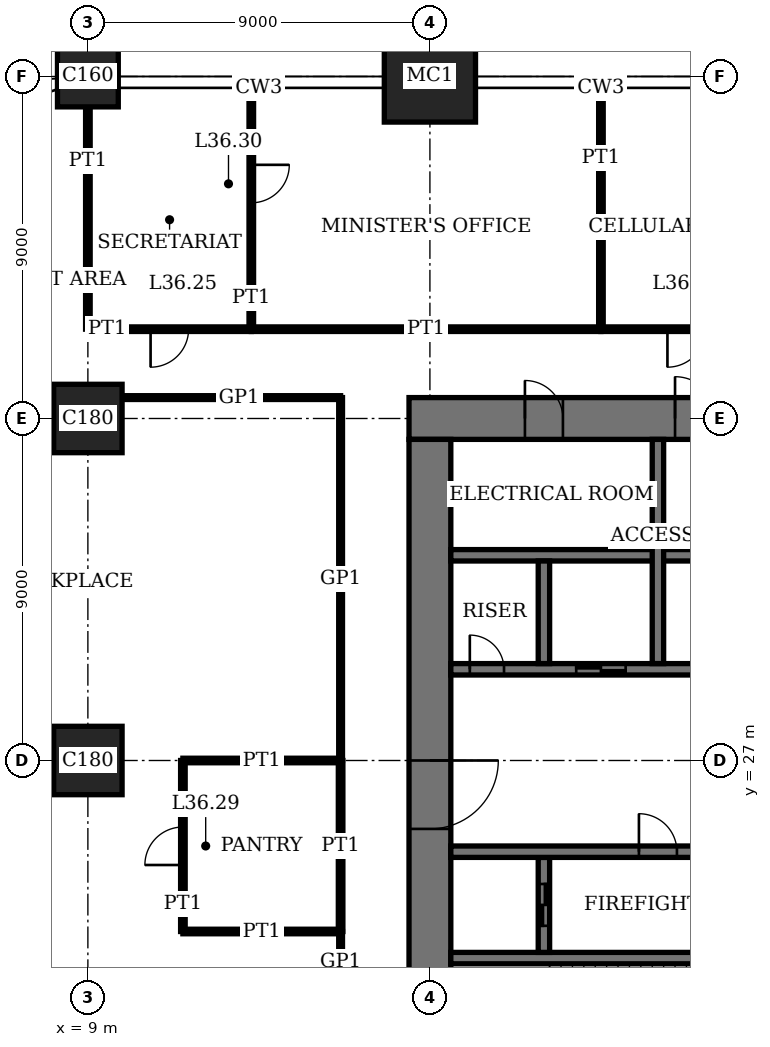
"""IFC4 building model, lengths in metres.
Left out: names, types, materials, properties, quantities, classifications, styles, units other than length and angle.
Written with IfcOpenShell. Run it as: python <this file> out.ifc"""

import sys

from ifc_helpers import new_model, si_unit, direction, frame, frame_2d, origin, origin_2d, place, context, subcontext, project, spatial, rectangle, extrude, element, fill, save


model = new_model("IFC4")
c1 = context("Model", 3, precision=1e-05, world=origin(), true_north=direction((0.0, 1.0)))
c2 = subcontext(c1, "Body", "Model", "MODEL_VIEW")
j1 = project(units=[si_unit("LENGTHUNIT", "METRE"), si_unit("PLANEANGLEUNIT", "RADIAN")], contexts=[c1])
p1 = place(None, origin())
s1 = spatial("IfcSite", under=j1, at=p1, CompositionType="ELEMENT")
p2 = place(p1, origin())
s2 = spatial("IfcBuilding", under=s1, at=p2, CompositionType="ELEMENT")
p3 = place(p2, frame((0.0, 0.0, 149.0)))
s3 = spatial("IfcBuildingStorey", under=s2, at=p3, CompositionType="ELEMENT", Elevation=149.0)
for number, where, z_axis, x_axis in (
    (1, (9.0, 27.0, 0.0), (0.0, 0.0, 1.0), (1.0, 0.0, 0.0)),
    (2, (9.0, 36.0, 0.0), (0.0, 0.0, 1.0), (1.0, 0.0, 0.0)),
):
    element("IfcColumn", number, at=place(p3, frame(where, z_axis=z_axis, x_axis=x_axis)), inside=s3, PredefinedType="COLUMN", context=c2, shape_type="SweptSolid", body=[
        extrude(rectangle(XDim=1.8, YDim=1.8, at=origin_2d()), origin(), (0.0, 0.0, 1.0), 4.0),
    ])
p4 = place(p3, frame((9.0, 45.0, 0.0), z_axis=(0.0, 0.0, 1.0), x_axis=(1.0, 0.0, 0.0)))
e3 = element("IfcColumn", 3, at=p4, inside=s3, PredefinedType="COLUMN", context=c2, shape_type="SweptSolid", body=[
    extrude(rectangle(XDim=1.6, YDim=1.6, at=origin_2d()), origin(), (0.0, 0.0, 1.0), 4.0),
])
p5 = place(p3, frame((18.0, 45.0, 0.0), z_axis=(0.0, 0.0, 1.0), x_axis=(1.0, 0.0, 0.0)))
e4 = element("IfcColumn", 4, at=p5, inside=s3, PredefinedType="COLUMN", context=c2, shape_type="SweptSolid", body=[
    extrude(rectangle(XDim=2.4, YDim=2.4, at=origin_2d()), origin(), (0.0, 0.0, 1.0), 4.0),
])
p6 = place(p3, frame((45.55, 36.0, 0.0), z_axis=(0.0, 0.0, 1.0), x_axis=(-1.0, 0.0, 0.0)))
e5 = element("IfcWall", 5, at=p6, inside=s3, PredefinedType="SHEAR", context=c2, shape_type="SweptSolid", body=[
    extrude(rectangle(XDim=28.1, YDim=1.1, at=frame_2d((14.05, 0.0))), origin(), (0.0, 0.0, 1.0), 4.0),
])
p7 = place(p6, frame((11.55, 0.0, 0.0)))
e6 = element("IfcOpeningElement", 6, at=p7, cuts=e5, PredefinedType="OPENING", context=c2, shape_type="SweptSolid", body=[
    extrude(rectangle(XDim=1.0, YDim=2.4, at=frame_2d((0.5, 1.2))), frame((0.0, 0.56, 0.0), z_axis=(0.0, -1.0, 0.0), x_axis=(1.0, 0.0, 0.0)), (0.0, 0.0, 1.0), 1.12),
])
p8 = place(p6, frame((16.55, 0.0, 0.0)))
e7 = element("IfcOpeningElement", 7, at=p8, cuts=e5, PredefinedType="OPENING", context=c2, shape_type="SweptSolid", body=[
    extrude(rectangle(XDim=1.0, YDim=2.4, at=frame_2d((0.5, 1.2))), frame((0.0, 0.56, 0.0), z_axis=(0.0, -1.0, 0.0), x_axis=(1.0, 0.0, 0.0)), (0.0, 0.0, 1.0), 1.12),
])
p9 = place(p6, frame((20.0, 0.0, 0.0)))
e8 = element("IfcOpeningElement", 8, at=p9, cuts=e5, PredefinedType="OPENING", context=c2, shape_type="SweptSolid", body=[
    extrude(rectangle(XDim=1.1, YDim=2.4, at=frame_2d((0.55, 1.2))), frame((0.0, 0.56, 0.0), z_axis=(0.0, -1.0, 0.0), x_axis=(1.0, 0.0, 0.0)), (0.0, 0.0, 1.0), 1.12),
])
p10 = place(p6, frame((24.05, 0.0, 0.0)))
e9 = element("IfcOpeningElement", 9, at=p10, cuts=e5, PredefinedType="OPENING", context=c2, shape_type="SweptSolid", body=[
    extrude(rectangle(XDim=1.0, YDim=2.4, at=frame_2d((0.5, 1.2))), frame((0.0, 0.56, 0.0), z_axis=(0.0, -1.0, 0.0), x_axis=(1.0, 0.0, 0.0)), (0.0, 0.0, 1.0), 1.12),
])
p11 = place(p3, frame((18.0, 35.45, 0.0), z_axis=(0.0, 0.0, 1.0), x_axis=(0.0, -1.0, 0.0)))
e10 = element("IfcWall", 10, at=p11, inside=s3, PredefinedType="SHEAR", context=c2, shape_type="SweptSolid", body=[
    extrude(rectangle(XDim=16.9, YDim=1.1, at=frame_2d((8.45, 0.0))), origin(), (0.0, 0.0, 1.0), 4.0),
])
p12 = place(p11, frame((8.45, 0.0, 0.0)))
e11 = element("IfcOpeningElement", 11, at=p12, cuts=e10, PredefinedType="OPENING", context=c2, shape_type="SweptSolid", body=[
    extrude(rectangle(XDim=1.8, YDim=2.4, at=frame_2d((0.9, 1.2))), frame((0.0, 0.56, 0.0), z_axis=(0.0, -1.0, 0.0), x_axis=(1.0, 0.0, 0.0)), (0.0, 0.0, 1.0), 1.12),
])
p13 = place(p3, frame((18.55, 21.8, 0.0), z_axis=(0.0, 0.0, 1.0), x_axis=(1.0, 0.0, 0.0)))
e12 = element("IfcWall", 12, at=p13, inside=s3, PredefinedType="SHEAR", context=c2, shape_type="SweptSolid", body=[
    extrude(rectangle(XDim=8.3, YDim=0.3, at=frame_2d((4.15, 0.0))), origin(), (0.0, 0.0, 1.0), 4.0),
])
p14 = place(p13, frame((6.85, 0.0, 0.0)))
e13 = element("IfcOpeningElement", 13, at=p14, cuts=e12, PredefinedType="OPENING", context=c2, shape_type="SweptSolid", body=[
    extrude(rectangle(XDim=1.0, YDim=2.4, at=frame_2d((0.5, 1.2))), frame((0.0, 0.16, 0.0), z_axis=(0.0, -1.0, 0.0), x_axis=(1.0, 0.0, 0.0)), (0.0, 0.0, 1.0), 0.32),
])
p15 = place(p3, frame((21.0, 21.95, 0.0), z_axis=(0.0, 0.0, 1.0), x_axis=(0.0, 1.0, 0.0)))
e14 = element("IfcWall", 14, at=p15, inside=s3, PredefinedType="SHEAR", context=c2, shape_type="SweptSolid", body=[
    extrude(rectangle(XDim=2.5, YDim=0.3, at=frame_2d((1.25, 0.0))), origin(), (0.0, 0.0, 1.0), 4.0),
])
p16 = place(p15, frame((0.7, 0.0, 0.0)))
e15 = element("IfcOpeningElement", 15, at=p16, cuts=e14, PredefinedType="OPENING", context=c2, shape_type="SweptSolid", body=[
    extrude(rectangle(XDim=1.1, YDim=2.4, at=frame_2d((0.55, 1.2))), frame((0.0, 0.16, 0.0), z_axis=(0.0, -1.0, 0.0), x_axis=(1.0, 0.0, 0.0)), (0.0, 0.0, 1.0), 0.32),
])
p17 = place(p3, frame((18.55, 24.6, 0.0), z_axis=(0.0, 0.0, 1.0), x_axis=(1.0, 0.0, 0.0)))
e16 = element("IfcWall", 16, at=p17, inside=s3, PredefinedType="SHEAR", context=c2, shape_type="SweptSolid", body=[
    extrude(rectangle(XDim=25.9, YDim=0.3, at=frame_2d((12.95, 0.0))), origin(), (0.0, 0.0, 1.0), 4.0),
])
p18 = place(p17, frame((4.95, 0.0, 0.0)))
e17 = element("IfcOpeningElement", 17, at=p18, cuts=e16, PredefinedType="OPENING", context=c2, shape_type="SweptSolid", body=[
    extrude(rectangle(XDim=1.0, YDim=2.4, at=frame_2d((0.5, 1.2))), frame((0.0, 0.16, 0.0), z_axis=(0.0, -1.0, 0.0), x_axis=(1.0, 0.0, 0.0)), (0.0, 0.0, 1.0), 0.32),
])
p19 = place(p17, frame((24.5, 0.0, 0.0)))
e18 = element("IfcOpeningElement", 18, at=p19, cuts=e16, PredefinedType="OPENING", context=c2, shape_type="SweptSolid", body=[
    extrude(rectangle(XDim=0.9, YDim=2.1, at=frame_2d((0.45, 1.05))), frame((0.0, 0.16, 0.0), z_axis=(0.0, -1.0, 0.0), x_axis=(1.0, 0.0, 0.0)), (0.0, 0.0, 1.0), 0.32),
])
p20 = place(p17, frame((21.3, 0.0, 0.0)))
e19 = element("IfcOpeningElement", 19, at=p20, cuts=e16, PredefinedType="OPENING", context=c2, shape_type="SweptSolid", body=[
    extrude(rectangle(XDim=1.3, YDim=2.4, at=frame_2d((0.65, 1.2))), frame((0.0, 0.16, 0.0), z_axis=(0.0, -1.0, 0.0), x_axis=(1.0, 0.0, 0.0)), (0.0, 0.0, 1.0), 0.32),
])
p21 = place(p3, frame((18.55, 29.4, 0.0), z_axis=(0.0, 0.0, 1.0), x_axis=(1.0, 0.0, 0.0)))
e20 = element("IfcWall", 20, at=p21, inside=s3, PredefinedType="SHEAR", context=c2, shape_type="SweptSolid", body=[
    extrude(rectangle(XDim=25.9, YDim=0.3, at=frame_2d((12.95, 0.0))), origin(), (0.0, 0.0, 1.0), 4.0),
])
p22 = place(p21, frame((19.95, 0.0, 0.0)))
e21 = element("IfcOpeningElement", 21, at=p22, cuts=e20, PredefinedType="OPENING", context=c2, shape_type="SweptSolid", body=[
    extrude(rectangle(XDim=1.0, YDim=2.4, at=frame_2d((0.5, 1.2))), frame((0.0, 0.16, 0.0), z_axis=(0.0, -1.0, 0.0), x_axis=(1.0, 0.0, 0.0)), (0.0, 0.0, 1.0), 0.32),
])
p23 = place(p21, frame((0.5, 0.0, 0.0)))
e22 = element("IfcOpeningElement", 22, at=p23, cuts=e20, PredefinedType="OPENING", context=c2, shape_type="SweptSolid", body=[
    extrude(rectangle(XDim=0.9, YDim=2.1, at=frame_2d((0.45, 1.05))), frame((0.0, 0.16, 0.0), z_axis=(0.0, -1.0, 0.0), x_axis=(1.0, 0.0, 0.0)), (0.0, 0.0, 1.0), 0.32),
])
p24 = place(p21, frame((15.4, 0.0, 0.0)))
e23 = element("IfcOpeningElement", 23, at=p24, cuts=e20, PredefinedType="OPENING", context=c2, shape_type="SweptSolid", body=[
    extrude(rectangle(XDim=1.1, YDim=2.4, at=frame_2d((0.55, 1.2))), frame((0.0, 0.16, 0.0), z_axis=(0.0, -1.0, 0.0), x_axis=(1.0, 0.0, 0.0)), (0.0, 0.0, 1.0), 0.32),
])
p25 = place(p21, frame((12.4, 0.0, 0.0)))
e24 = element("IfcOpeningElement", 24, at=p25, cuts=e20, PredefinedType="OPENING", context=c2, shape_type="SweptSolid", body=[
    extrude(rectangle(XDim=1.1, YDim=2.4, at=frame_2d((0.55, 1.2))), frame((0.0, 0.16, 0.0), z_axis=(0.0, -1.0, 0.0), x_axis=(1.0, 0.0, 0.0)), (0.0, 0.0, 1.0), 0.32),
])
p26 = place(p21, frame((3.3, 0.0, 0.0)))
e25 = element("IfcOpeningElement", 25, at=p26, cuts=e20, PredefinedType="OPENING", context=c2, shape_type="SweptSolid", body=[
    extrude(rectangle(XDim=1.3, YDim=2.4, at=frame_2d((0.65, 1.2))), frame((0.0, 0.16, 0.0), z_axis=(0.0, -1.0, 0.0), x_axis=(1.0, 0.0, 0.0)), (0.0, 0.0, 1.0), 0.32),
])
p27 = place(p3, frame((18.55, 32.4, 0.0), z_axis=(0.0, 0.0, 1.0), x_axis=(1.0, 0.0, 0.0)))
e26 = element("IfcWall", 26, at=p27, inside=s3, PredefinedType="SHEAR", context=c2, shape_type="SweptSolid", body=[
    extrude(rectangle(XDim=17.3, YDim=0.3, at=frame_2d((8.65, 0.0))), origin(), (0.0, 0.0, 1.0), 4.0),
])
p28 = place(p3, frame((24.0, 29.55, 0.0), z_axis=(0.0, 0.0, 1.0), x_axis=(0.0, 1.0, 0.0)))
e27 = element("IfcWall", 27, at=p28, inside=s3, PredefinedType="SHEAR", context=c2, shape_type="SweptSolid", body=[
    extrude(rectangle(XDim=5.9, YDim=0.3, at=frame_2d((2.95, 0.0))), origin(), (0.0, 0.0, 1.0), 4.0),
])
p29 = place(p3, frame((21.0, 29.55, 0.0), z_axis=(0.0, 0.0, 1.0), x_axis=(0.0, 1.0, 0.0)))
e28 = element("IfcWall", 28, at=p29, inside=s3, PredefinedType="SHEAR", context=c2, shape_type="SweptSolid", body=[
    extrude(rectangle(XDim=2.7, YDim=0.3, at=frame_2d((1.35, 0.0))), origin(), (0.0, 0.0, 1.0), 4.0),
])
p30 = place(p3, frame((11.5, 22.5, 0.0), z_axis=(0.0, 0.0, 1.0), x_axis=(1.0, 0.0, 0.0)))
e29 = element("IfcWall", 29, at=p30, inside=s3, PredefinedType="PARTITIONING", context=c2, shape_type="SweptSolid", body=[
    extrude(rectangle(XDim=4.15, YDim=0.12, at=frame_2d((2.075, 0.0))), origin(), (0.0, 0.0, 1.0), 3.1),
])
p31 = place(p3, frame((11.5, 27.0, 0.0), z_axis=(0.0, 0.0, 1.0), x_axis=(1.0, 0.0, 0.0)))
e30 = element("IfcWall", 30, at=p31, inside=s3, PredefinedType="PARTITIONING", context=c2, shape_type="SweptSolid", body=[
    extrude(rectangle(XDim=4.15, YDim=0.12, at=frame_2d((2.075, 0.0))), origin(), (0.0, 0.0, 1.0), 3.05),
])
p32 = place(p3, frame((1.2, 36.55, 0.0), z_axis=(0.0, 0.0, 1.0), x_axis=(1.0, 0.0, 0.0)))
e31 = element("IfcWall", 31, at=p32, inside=s3, PredefinedType="PARTITIONING", context=c2, shape_type="SweptSolid", body=[
    extrude(rectangle(XDim=6.9, YDim=0.1, at=frame_2d((3.45, 0.0))), origin(), (0.0, 0.0, 1.0), 3.05),
])
p33 = place(p3, frame((9.9, 36.55, 0.0), z_axis=(0.0, 0.0, 1.0), x_axis=(1.0, 0.0, 0.0)))
e32 = element("IfcWall", 32, at=p33, inside=s3, PredefinedType="PARTITIONING", context=c2, shape_type="SweptSolid", body=[
    extrude(rectangle(XDim=5.75, YDim=0.1, at=frame_2d((2.875, 0.0))), origin(), (0.0, 0.0, 1.0), 3.05),
])
p34 = place(p3, frame((9.0, 38.35, 0.0), z_axis=(0.0, 0.0, 1.0), x_axis=(1.0, 0.0, 0.0)))
e33 = element("IfcWall", 33, at=p34, inside=s3, PredefinedType="PARTITIONING", context=c2, shape_type="SweptSolid", body=[
    extrude(rectangle(XDim=4.3, YDim=0.12, at=frame_2d((2.15, 0.0))), origin(), (0.0, 0.0, 1.0), 3.75),
])
p35 = place(p34, frame((1.65, 0.0, 0.0)))
e34 = element("IfcOpeningElement", 34, at=p35, cuts=e33, PredefinedType="OPENING", context=c2, shape_type="SweptSolid", body=[
    extrude(rectangle(XDim=1.0, YDim=2.4, at=frame_2d((0.5, 1.2))), frame((0.0, 0.07, 0.0), z_axis=(0.0, -1.0, 0.0), x_axis=(1.0, 0.0, 0.0)), (0.0, 0.0, 1.0), 0.14),
])
p36 = place(p3, frame((13.3, 38.35, 0.0), z_axis=(0.0, 0.0, 1.0), x_axis=(1.0, 0.0, 0.0)))
e35 = element("IfcWall", 35, at=p36, inside=s3, PredefinedType="PARTITIONING", context=c2, shape_type="SweptSolid", body=[
    extrude(rectangle(XDim=9.2, YDim=0.12, at=frame_2d((4.6, 0.0))), origin(), (0.0, 0.0, 1.0), 3.75),
])
p37 = place(p3, frame((22.5, 38.35, 0.0), z_axis=(0.0, 0.0, 1.0), x_axis=(1.0, 0.0, 0.0)))
e36 = element("IfcWall", 36, at=p37, inside=s3, PredefinedType="PARTITIONING", context=c2, shape_type="SweptSolid", body=[
    extrude(rectangle(XDim=4.5, YDim=0.12, at=frame_2d((2.25, 0.0))), origin(), (0.0, 0.0, 1.0), 3.75),
])
p38 = place(p37, frame((1.75, 0.0, 0.0)))
e37 = element("IfcOpeningElement", 37, at=p38, cuts=e36, PredefinedType="OPENING", context=c2, shape_type="SweptSolid", body=[
    extrude(rectangle(XDim=1.0, YDim=2.4, at=frame_2d((0.5, 1.2))), frame((0.0, 0.07, 0.0), z_axis=(0.0, -1.0, 0.0), x_axis=(1.0, 0.0, 0.0)), (0.0, 0.0, 1.0), 0.14),
])
p39 = place(p3, frame((9.0, 38.35, 0.0), z_axis=(0.0, 0.0, 1.0), x_axis=(0.0, 1.0, 0.0)))
e38 = element("IfcWall", 38, at=p39, inside=s3, PredefinedType="PARTITIONING", context=c2, shape_type="SweptSolid", body=[
    extrude(rectangle(XDim=5.85, YDim=0.12, at=frame_2d((2.925, 0.0))), origin(), (0.0, 0.0, 1.0), 3.05),
])
p40 = place(p3, frame((11.5, 22.5, 0.0), z_axis=(0.0, 0.0, 1.0), x_axis=(0.0, 1.0, 0.0)))
e39 = element("IfcWall", 39, at=p40, inside=s3, PredefinedType="PARTITIONING", context=c2, shape_type="SweptSolid", body=[
    extrude(rectangle(XDim=4.5, YDim=0.12, at=frame_2d((2.25, 0.0))), origin(), (0.0, 0.0, 1.0), 3.75),
])
p41 = place(p40, frame((1.75, 0.0, 0.0)))
e40 = element("IfcOpeningElement", 40, at=p41, cuts=e39, PredefinedType="OPENING", context=c2, shape_type="SweptSolid", body=[
    extrude(rectangle(XDim=1.0, YDim=2.4, at=frame_2d((0.5, 1.2))), frame((0.0, 0.07, 0.0), z_axis=(0.0, -1.0, 0.0), x_axis=(1.0, 0.0, 0.0)), (0.0, 0.0, 1.0), 0.14),
])
p42 = place(p3, frame((13.3, 38.35, 0.0), z_axis=(0.0, 0.0, 1.0), x_axis=(0.0, 1.0, 0.0)))
e41 = element("IfcWall", 41, at=p42, inside=s3, PredefinedType="PARTITIONING", context=c2, shape_type="SweptSolid", body=[
    extrude(rectangle(XDim=6.34, YDim=0.12, at=frame_2d((3.17, 0.0))), origin(), (0.0, 0.0, 1.0), 3.75),
])
p43 = place(p42, frame((3.325, 0.0, 0.0)))
e42 = element("IfcOpeningElement", 42, at=p43, cuts=e41, PredefinedType="OPENING", context=c2, shape_type="SweptSolid", body=[
    extrude(rectangle(XDim=1.0, YDim=2.4, at=frame_2d((0.5, 1.2))), frame((0.0, 0.07, 0.0), z_axis=(0.0, -1.0, 0.0), x_axis=(1.0, 0.0, 0.0)), (0.0, 0.0, 1.0), 0.14),
])
p44 = place(p3, frame((15.65, 22.5, 0.0), z_axis=(0.0, 0.0, 1.0), x_axis=(0.0, 1.0, 0.0)))
e43 = element("IfcWall", 43, at=p44, inside=s3, PredefinedType="PARTITIONING", context=c2, shape_type="SweptSolid", body=[
    extrude(rectangle(XDim=4.5, YDim=0.12, at=frame_2d((2.25, 0.0))), origin(), (0.0, 0.0, 1.0), 3.75),
])
p45 = place(p3, frame((15.65, 15.65, 0.0), z_axis=(0.0, 0.0, 1.0), x_axis=(0.0, 1.0, 0.0)))
e44 = element("IfcWall", 44, at=p45, inside=s3, PredefinedType="PARTITIONING", context=c2, shape_type="SweptSolid", body=[
    extrude(rectangle(XDim=6.85, YDim=0.1, at=frame_2d((3.425, 0.0))), origin(), (0.0, 0.0, 1.0), 3.75),
])
p46 = place(p45, frame((2.925, 0.0, 0.0)))
e45 = element("IfcOpeningElement", 45, at=p46, cuts=e44, PredefinedType="OPENING", context=c2, shape_type="SweptSolid", body=[
    extrude(rectangle(XDim=1.0, YDim=2.4, at=frame_2d((0.5, 1.2))), frame((0.0, 0.06, 0.0), z_axis=(0.0, -1.0, 0.0), x_axis=(1.0, 0.0, 0.0)), (0.0, 0.0, 1.0), 0.12),
])
p47 = place(p3, frame((15.65, 27.0, 0.0), z_axis=(0.0, 0.0, 1.0), x_axis=(0.0, 1.0, 0.0)))
e46 = element("IfcWall", 46, at=p47, inside=s3, PredefinedType="PARTITIONING", context=c2, shape_type="SweptSolid", body=[
    extrude(rectangle(XDim=9.55, YDim=0.1, at=frame_2d((4.775, 0.0))), origin(), (0.0, 0.0, 1.0), 3.75),
])
p48 = place(p3, frame((22.5, 38.35, 0.0), z_axis=(0.0, 0.0, 1.0), x_axis=(0.0, 1.0, 0.0)))
e47 = element("IfcWall", 47, at=p48, inside=s3, PredefinedType="PARTITIONING", context=c2, shape_type="SweptSolid", body=[
    extrude(rectangle(XDim=6.34, YDim=0.12, at=frame_2d((3.17, 0.0))), origin(), (0.0, 0.0, 1.0), 3.75),
])
p49 = place(p12, origin())
e48 = element("IfcDoor", 48, at=p49, inside=s3, OperationType="DOUBLE_DOOR_DOUBLE_SWING", PredefinedType="DOOR", context=c2, shape_type="SweptSolid", body=[
    extrude(rectangle(XDim=1.8, YDim=2.4, at=frame_2d((0.9, 1.2))), frame((0.0, 0.03, 0.0), z_axis=(0.0, -1.0, 0.0), x_axis=(1.0, 0.0, 0.0)), (0.0, 0.0, 1.0), 0.06),
    extrude(rectangle(XDim=0.04, YDim=2.4, at=frame_2d((0.02, 1.2))), frame((0.0, 0.55, 0.0), z_axis=(0.0, -1.0, 0.0), x_axis=(1.0, 0.0, 0.0)), (0.0, 0.0, 1.0), 1.1),
    extrude(rectangle(XDim=0.04, YDim=2.4, at=frame_2d((1.78, 1.2))), frame((0.0, 0.55, 0.0), z_axis=(0.0, -1.0, 0.0), x_axis=(1.0, 0.0, 0.0)), (0.0, 0.0, 1.0), 1.1),
    extrude(rectangle(XDim=1.8, YDim=0.04, at=frame_2d((0.9, 2.38))), frame((0.0, 0.55, 0.0), z_axis=(0.0, -1.0, 0.0), x_axis=(1.0, 0.0, 0.0)), (0.0, 0.0, 1.0), 1.1),
])
fill(e11, e48)
p50 = place(p9, origin())
e49 = element("IfcDoor", 49, at=p50, inside=s3, OperationType="SINGLE_SWING_RIGHT", PredefinedType="DOOR", context=c2, shape_type="SweptSolid", body=[
    extrude(rectangle(XDim=1.1, YDim=2.4, at=frame_2d((0.55, 1.2))), frame((0.0, 0.025, 0.0), z_axis=(0.0, -1.0, 0.0), x_axis=(1.0, 0.0, 0.0)), (0.0, 0.0, 1.0), 0.05),
    extrude(rectangle(XDim=0.04, YDim=2.4, at=frame_2d((0.02, 1.2))), frame((0.0, 0.44, 0.0), z_axis=(0.0, -1.0, 0.0), x_axis=(1.0, 0.0, 0.0)), (0.0, 0.0, 1.0), 0.88),
    extrude(rectangle(XDim=0.04, YDim=2.4, at=frame_2d((1.08, 1.2))), frame((0.0, 0.44, 0.0), z_axis=(0.0, -1.0, 0.0), x_axis=(1.0, 0.0, 0.0)), (0.0, 0.0, 1.0), 0.88),
    extrude(rectangle(XDim=1.1, YDim=0.04, at=frame_2d((0.55, 2.38))), frame((0.0, 0.44, 0.0), z_axis=(0.0, -1.0, 0.0), x_axis=(1.0, 0.0, 0.0)), (0.0, 0.0, 1.0), 0.88),
])
fill(e8, e49)
p51 = place(p10, origin())
e50 = element("IfcDoor", 50, at=p51, inside=s3, OperationType="SINGLE_SWING_RIGHT", PredefinedType="DOOR", context=c2, shape_type="SweptSolid", body=[
    extrude(rectangle(XDim=1.0, YDim=2.4, at=frame_2d((0.5, 1.2))), frame((0.0, 0.025, 0.0), z_axis=(0.0, -1.0, 0.0), x_axis=(1.0, 0.0, 0.0)), (0.0, 0.0, 1.0), 0.05),
    extrude(rectangle(XDim=0.04, YDim=2.4, at=frame_2d((0.02, 1.2))), frame((0.0, 0.4, 0.0), z_axis=(0.0, -1.0, 0.0), x_axis=(1.0, 0.0, 0.0)), (0.0, 0.0, 1.0), 0.8),
    extrude(rectangle(XDim=0.04, YDim=2.4, at=frame_2d((0.98, 1.2))), frame((0.0, 0.4, 0.0), z_axis=(0.0, -1.0, 0.0), x_axis=(1.0, 0.0, 0.0)), (0.0, 0.0, 1.0), 0.8),
    extrude(rectangle(XDim=1.0, YDim=0.04, at=frame_2d((0.5, 2.38))), frame((0.0, 0.4, 0.0), z_axis=(0.0, -1.0, 0.0), x_axis=(1.0, 0.0, 0.0)), (0.0, 0.0, 1.0), 0.8),
])
fill(e9, e50)
p52 = place(p18, origin())
e51 = element("IfcDoor", 51, at=p52, inside=s3, OperationType="SINGLE_SWING_RIGHT", PredefinedType="DOOR", context=c2, shape_type="SweptSolid", body=[
    extrude(rectangle(XDim=1.0, YDim=2.4, at=frame_2d((0.5, 1.2))), frame((0.0, 0.03, 0.0), z_axis=(0.0, -1.0, 0.0), x_axis=(1.0, 0.0, 0.0)), (0.0, 0.0, 1.0), 0.06),
])
fill(e17, e51)
p53 = place(p23, origin())
e52 = element("IfcDoor", 52, at=p53, inside=s3, OperationType="SINGLE_SWING_RIGHT", PredefinedType="DOOR", context=c2, shape_type="SweptSolid", body=[
    extrude(rectangle(XDim=0.9, YDim=2.1, at=frame_2d((0.45, 1.05))), frame((0.0, 0.03, 0.0), z_axis=(0.0, -1.0, 0.0), x_axis=(1.0, 0.0, 0.0)), (0.0, 0.0, 1.0), 0.06),
])
fill(e22, e52)
p54 = place(p35, origin())
e53 = element("IfcDoor", 53, at=p54, inside=s3, OperationType="SINGLE_SWING_LEFT", PredefinedType="DOOR", context=c2, shape_type="SweptSolid", body=[
    extrude(rectangle(XDim=1.0, YDim=2.4, at=frame_2d((0.5, 1.2))), frame((0.0, 0.025, 0.0), z_axis=(0.0, -1.0, 0.0), x_axis=(1.0, 0.0, 0.0)), (0.0, 0.0, 1.0), 0.05),
])
fill(e34, e53)
p55 = place(p38, origin())
e54 = element("IfcDoor", 54, at=p55, inside=s3, OperationType="SINGLE_SWING_LEFT", PredefinedType="DOOR", context=c2, shape_type="SweptSolid", body=[
    extrude(rectangle(XDim=1.0, YDim=2.4, at=frame_2d((0.5, 1.2))), frame((0.0, 0.025, 0.0), z_axis=(0.0, -1.0, 0.0), x_axis=(1.0, 0.0, 0.0)), (0.0, 0.0, 1.0), 0.05),
])
fill(e37, e54)
p56 = place(p41, origin())
e55 = element("IfcDoor", 55, at=p56, inside=s3, OperationType="SINGLE_SWING_RIGHT", PredefinedType="DOOR", context=c2, shape_type="SweptSolid", body=[
    extrude(rectangle(XDim=1.0, YDim=2.4, at=frame_2d((0.5, 1.2))), frame((0.0, 0.025, 0.0), z_axis=(0.0, -1.0, 0.0), x_axis=(1.0, 0.0, 0.0)), (0.0, 0.0, 1.0), 0.05),
])
fill(e40, e55)
p57 = place(p43, origin())
e56 = element("IfcDoor", 56, at=p57, inside=s3, OperationType="SINGLE_SWING_RIGHT", PredefinedType="DOOR", context=c2, shape_type="SweptSolid", body=[
    extrude(rectangle(XDim=1.0, YDim=2.4, at=frame_2d((0.5, 1.2))), frame((0.0, 0.025, 0.0), z_axis=(0.0, -1.0, 0.0), x_axis=(1.0, 0.0, 0.0)), (0.0, 0.0, 1.0), 0.05),
])
fill(e42, e56)
p58 = place(p26, origin())
e57 = element("IfcDoor", 57, at=p58, inside=s3, OperationType="DOUBLE_DOOR_SLIDING", PredefinedType="DOOR", context=c2, shape_type="SweptSolid", body=[
    extrude(rectangle(XDim=1.3, YDim=2.4, at=frame_2d((0.65, 1.2))), frame((0.0, 0.02, 0.0), z_axis=(0.0, -1.0, 0.0), x_axis=(1.0, 0.0, 0.0)), (0.0, 0.0, 1.0), 0.04),
])
fill(e25, e57)
p59 = place(p16, origin())
e58 = element("IfcDoor", 58, at=p59, inside=s3, OperationType="DOUBLE_DOOR_SLIDING", PredefinedType="DOOR", context=c2, shape_type="SweptSolid", body=[
    extrude(rectangle(XDim=1.1, YDim=2.4, at=frame_2d((0.55, 1.2))), frame((0.0, 0.03, 0.0), z_axis=(0.0, -1.0, 0.0), x_axis=(1.0, 0.0, 0.0)), (0.0, 0.0, 1.0), 0.06),
])
fill(e15, e58)
save(model, sys.argv[1])
